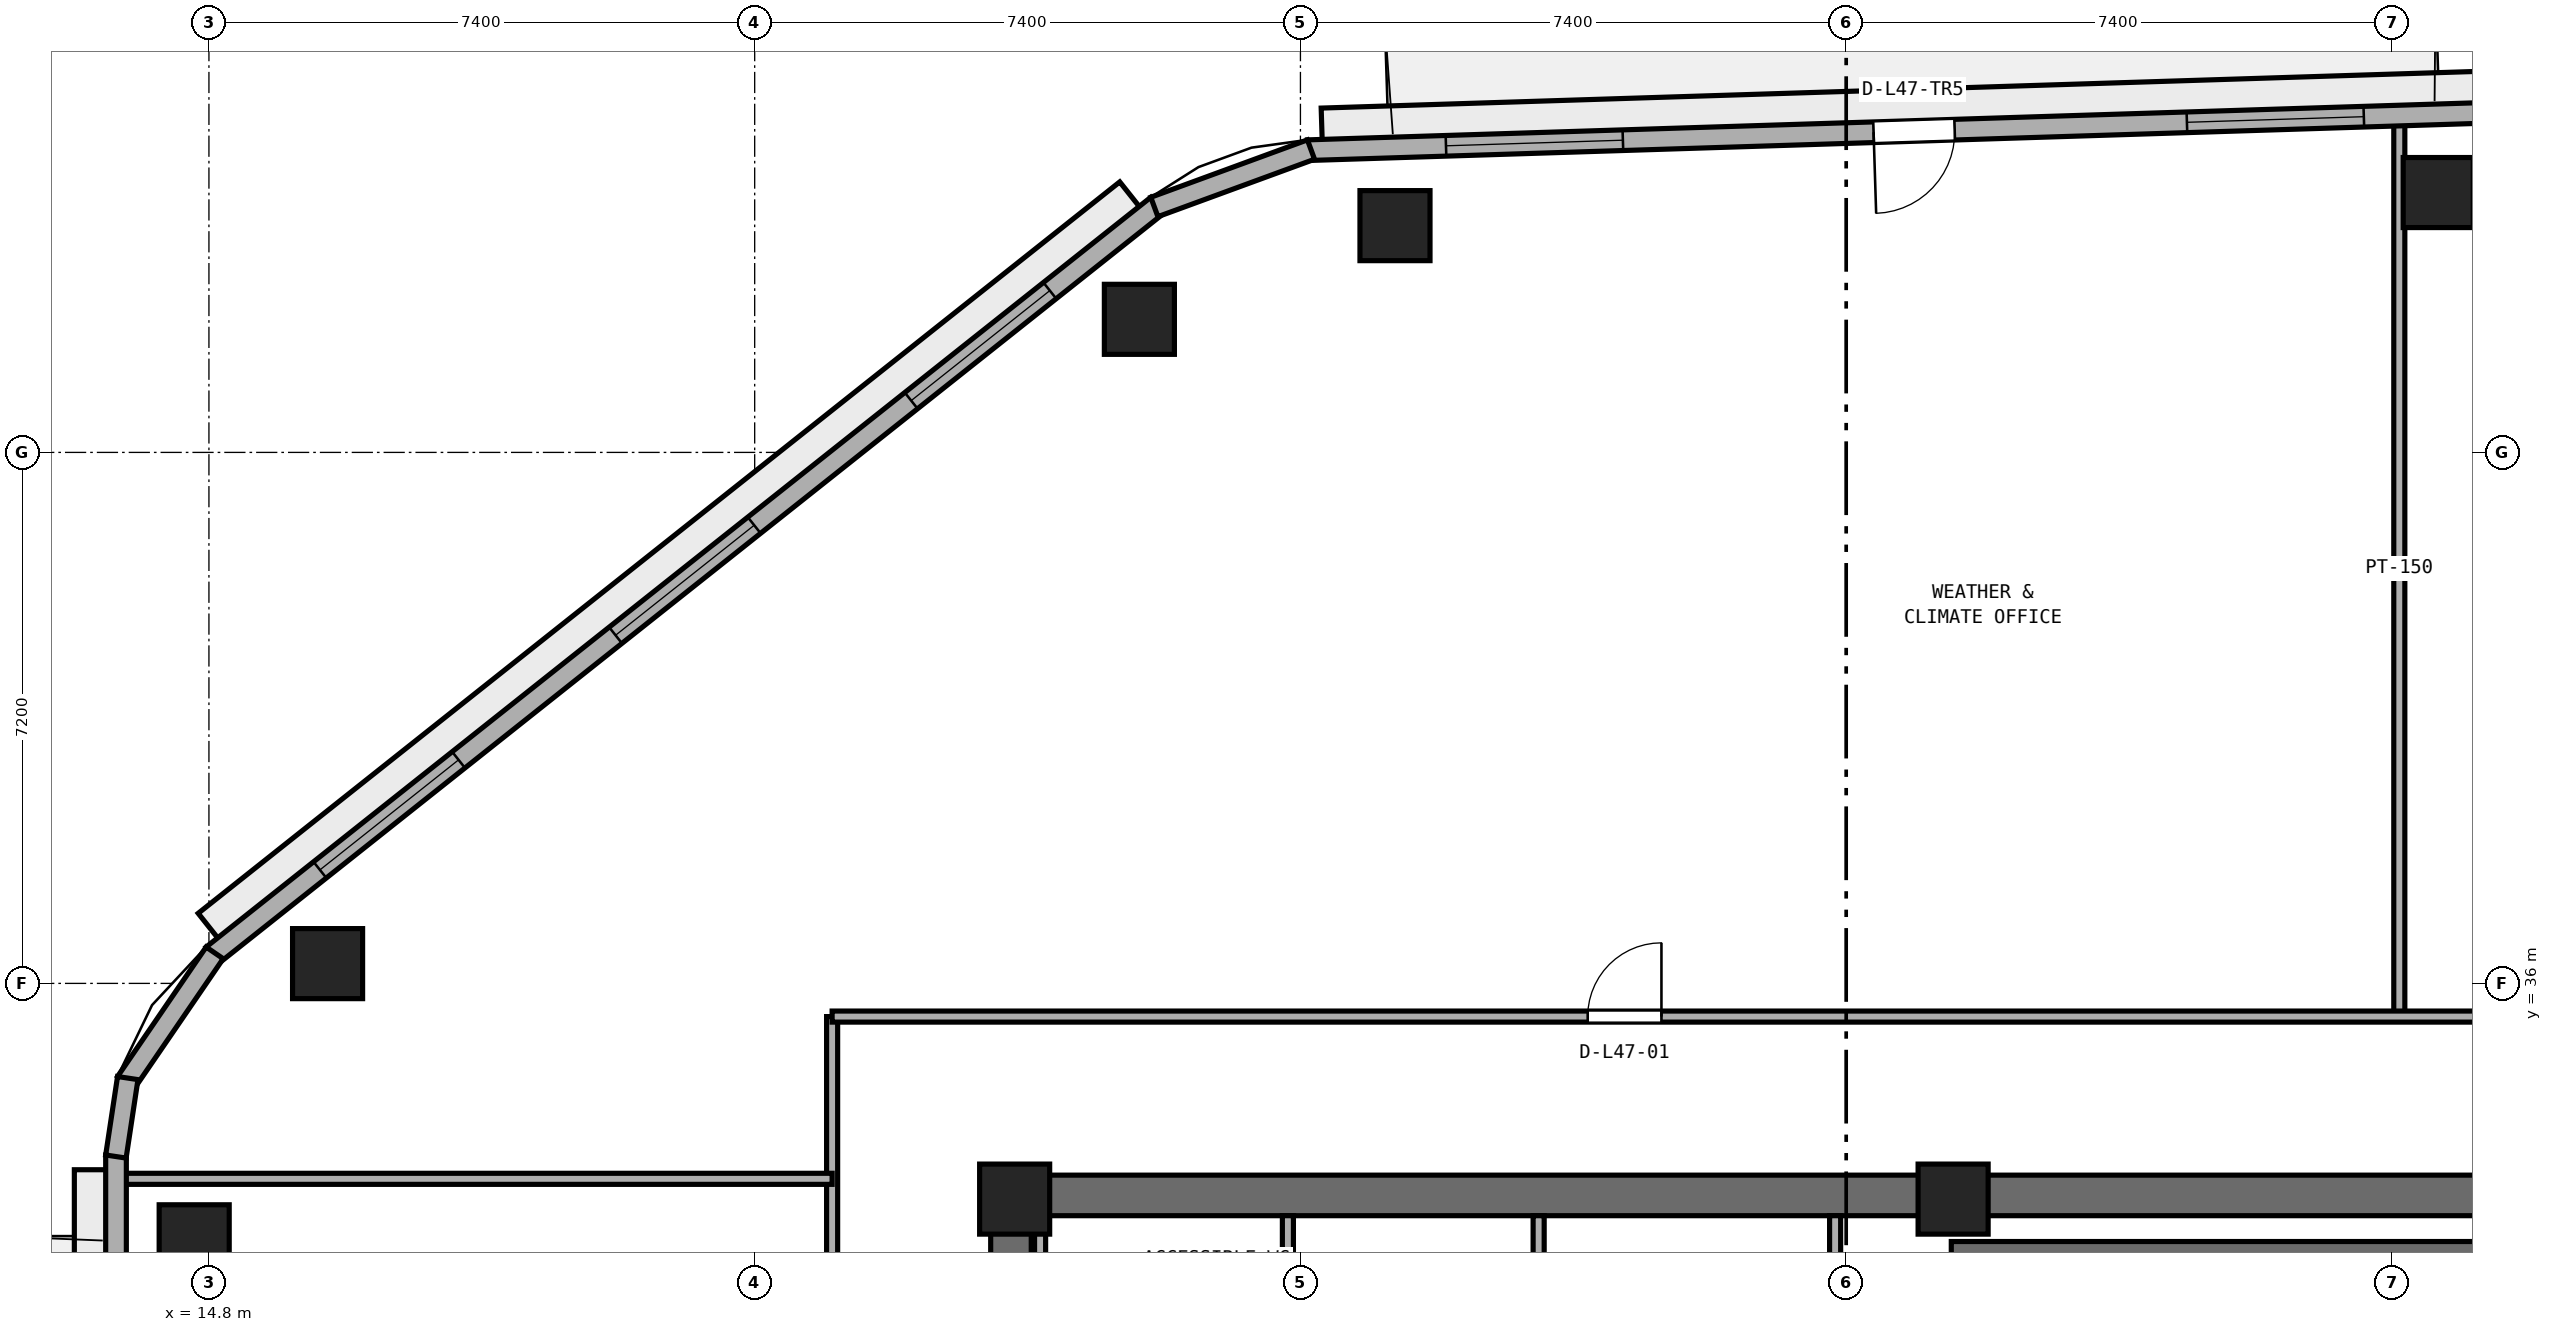
"""IFC4 building model, lengths in metres.
Left out: names, types, materials, properties, quantities, classifications, styles, units other than length and angle.
Written with IfcOpenShell. Run it as: python <this file> out.ifc"""

import sys

from ifc_helpers import new_model, si_unit, direction, frame, frame_2d, origin, origin_2d, place, context, subcontext, project, spatial, rectangle, extrude, element, fill, save


model = new_model("IFC4")
c1 = context("Model", 3, precision=1e-05, world=origin(), true_north=direction((0.0, 1.0)))
c2 = subcontext(c1, "Body", "Model", "MODEL_VIEW")
j1 = project(units=[si_unit("LENGTHUNIT", "METRE"), si_unit("PLANEANGLEUNIT", "RADIAN")], contexts=[c1])
p1 = place(None, origin())
s1 = spatial("IfcSite", under=j1, at=p1, CompositionType="ELEMENT")
p2 = place(p1, origin())
s2 = spatial("IfcBuilding", under=s1, at=p2, CompositionType="ELEMENT")
p3 = place(p2, frame((0.0, 0.0, 185.8)))
s3 = spatial("IfcBuildingStorey", under=s2, at=p3, CompositionType="ELEMENT", Elevation=185.8)
p4 = place(p3, frame((25.4, 33.125, 0.0), z_axis=(0.0, 0.0, 1.0), x_axis=(1.0, 0.0, 0.0)))
e1 = element("IfcWall", 1, at=p4, inside=s3, PredefinedType="SHEAR", context=c2, shape_type="SweptSolid", body=[
    extrude(rectangle(XDim=23.2, YDim=0.55, at=frame_2d((11.6, 0.0))), origin(), (0.0, 0.0, 1.0), 3.54),
])
p5 = place(p3, frame((25.675, 17.55, 0.0), z_axis=(0.0, 0.0, 1.0), x_axis=(0.0, 1.0, 0.0)))
e2 = element("IfcWall", 2, at=p5, inside=s3, PredefinedType="SHEAR", context=c2, shape_type="SweptSolid", body=[
    extrude(rectangle(XDim=15.3, YDim=0.55, at=frame_2d((7.65, 0.0))), origin(), (0.0, 0.0, 1.0), 3.54),
])
p6 = place(p5, frame((6.9, 0.0, 0.0)))
e3 = element("IfcOpeningElement", 3, at=p6, cuts=e2, PredefinedType="OPENING", context=c2, shape_type="SweptSolid", body=[
    extrude(rectangle(XDim=1.5, YDim=2.15, at=frame_2d((0.75, 1.075))), frame((0.0, 0.285, 0.0), z_axis=(0.0, -1.0, 0.0), x_axis=(1.0, 0.0, 0.0)), (0.0, 0.0, 1.0), 0.57),
])
for number, where, z_axis, x_axis in (
    (4, (38.45, 33.075, 0.0), (0.0, 0.0, 1.0), (1.0, 0.0, 0.0)),
    (5, (25.725, 33.075, 0.0), (0.0, 0.0, 1.0), (1.0, 0.0, 0.0)),
):
    element("IfcColumn", number, at=place(p3, frame(where, z_axis=z_axis, x_axis=x_axis)), inside=s3, PredefinedType="PILASTER", context=c2, shape_type="SweptSolid", body=[
        extrude(rectangle(XDim=0.95, YDim=0.95, at=origin_2d()), origin(), (0.0, 0.0, 1.0), 3.8),
    ])
for number, where, z_axis, x_axis in (
    (6, (45.028, 46.724, 0.0), (0.0, 0.0, 1.0), (1.0, 0.0, 0.0)),
    (7, (30.882, 46.275, 0.0), (0.0, 0.0, 1.0), (1.0, 0.0, 0.0)),
    (8, (27.416, 45.004, 0.0), (0.0, 0.0, 1.0), (1.0, 0.0, 0.0)),
    (9, (16.409, 36.268, 0.0), (0.0, 0.0, 1.0), (1.0, 0.0, 0.0)),
    (10, (14.6, 32.523, 0.0), (0.0, 0.0, 1.0), (1.0, 0.0, 0.0)),
):
    element("IfcColumn", number, at=place(p3, frame(where, z_axis=z_axis, x_axis=x_axis)), inside=s3, PredefinedType="COLUMN", context=c2, shape_type="SweptSolid", body=[
        extrude(rectangle(XDim=0.95, YDim=0.95, at=origin_2d()), origin(), (0.0, 0.0, 1.0), 3.8),
    ])
p7 = place(p3, frame((38.425, 32.375, 0.0), z_axis=(0.0, 0.0, 1.0), x_axis=(1.0, 0.0, 0.0)))
e11 = element("IfcWall", 11, at=p7, inside=s3, PredefinedType="SHEAR", context=c2, shape_type="SweptSolid", body=[
    extrude(rectangle(XDim=7.3, YDim=0.25, at=frame_2d((3.65, 0.0))), origin(), (0.0, 0.0, 1.0), 3.54),
])
p8 = place(p3, frame((26.07, 30.65, 0.0), z_axis=(0.0, 0.0, 1.0), x_axis=(0.0, 1.0, 0.0)))
e12 = element("IfcWall", 12, at=p8, inside=s3, PredefinedType="PARTITIONING", context=c2, shape_type="SweptSolid", body=[
    extrude(rectangle(XDim=2.2, YDim=0.15, at=frame_2d((1.1, 0.0))), origin(), (0.0, 0.0, 1.0), 2.64),
])
for number, where, z_axis, x_axis in (
    (13, (29.43, 30.65, 0.0), (0.0, 0.0, 1.0), (0.0, 1.0, 0.0)),
    (14, (32.83, 30.65, 0.0), (0.0, 0.0, 1.0), (0.0, 1.0, 0.0)),
    (15, (36.85, 30.65, 0.0), (0.0, 0.0, 1.0), (0.0, 1.0, 0.0)),
):
    element("IfcWall", number, at=place(p3, frame(where, z_axis=z_axis, x_axis=x_axis)), inside=s3, PredefinedType="PARTITIONING", context=c2, shape_type="SweptSolid", body=[
        extrude(rectangle(XDim=2.2, YDim=0.15, at=frame_2d((1.1, 0.0))), origin(), (0.0, 0.0, 1.0), 3.54),
    ])
p9 = place(p3, frame((44.5, 35.55, 0.0), z_axis=(0.0, 0.0, 1.0), x_axis=(0.0, 1.0, 0.0)))
e16 = element("IfcWall", 16, at=p9, inside=s3, PredefinedType="PARTITIONING", context=c2, shape_type="SweptSolid", body=[
    extrude(rectangle(XDim=12.152, YDim=0.15, at=frame_2d((6.076, 0.0))), origin(), (0.0, 0.0, 1.0), 3.54),
])
p10 = place(p3, frame((23.25, 26.55, 0.0), z_axis=(0.0, 0.0, 1.0), x_axis=(0.0, 1.0, 0.0)))
e17 = element("IfcWall", 17, at=p10, inside=s3, PredefinedType="PARTITIONING", context=c2, shape_type="SweptSolid", body=[
    extrude(rectangle(XDim=9.0, YDim=0.15, at=frame_2d((4.5, 0.0))), origin(), (0.0, 0.0, 1.0), 3.54),
])
p11 = place(p3, frame((13.605, 33.35, 0.0), z_axis=(0.0, 0.0, 1.0), x_axis=(1.0, 0.0, 0.0)))
e18 = element("IfcWall", 18, at=p11, inside=s3, PredefinedType="PARTITIONING", context=c2, shape_type="SweptSolid", body=[
    extrude(rectangle(XDim=9.645, YDim=0.15, at=frame_2d((4.823, 0.0))), origin(), (0.0, 0.0, 1.0), 3.54),
])
p12 = place(p3, frame((23.25, 35.55, 0.0), z_axis=(0.0, 0.0, 1.0), x_axis=(1.0, 0.0, 0.0)))
e19 = element("IfcWall", 19, at=p12, inside=s3, PredefinedType="PARTITIONING", context=c2, shape_type="SweptSolid", body=[
    extrude(rectangle(XDim=27.5, YDim=0.15, at=frame_2d((13.75, 0.0))), origin(), (0.0, 0.0, 1.0), 3.54),
])
p13 = place(p12, frame((10.245, 0.0, 0.0)))
e20 = element("IfcOpeningElement", 20, at=p13, cuts=e19, PredefinedType="OPENING", context=c2, shape_type="SweptSolid", body=[
    extrude(rectangle(XDim=1.0, YDim=2.12, at=frame_2d((0.5, 1.06))), frame((0.0, 0.085, 0.0), z_axis=(0.0, -1.0, 0.0), x_axis=(1.0, 0.0, 0.0)), (0.0, 0.0, 1.0), 0.17),
])
p14 = place(p12, frame((23.755, 0.0, 0.0)))
e21 = element("IfcOpeningElement", 21, at=p14, cuts=e19, PredefinedType="OPENING", context=c2, shape_type="SweptSolid", body=[
    extrude(rectangle(XDim=1.0, YDim=2.12, at=frame_2d((0.5, 1.06))), frame((0.0, 0.085, 0.0), z_axis=(0.0, -1.0, 0.0), x_axis=(1.0, 0.0, 0.0)), (0.0, 0.0, 1.0), 0.17),
])
p15 = place(p3, frame((46.143, 47.82, 0.0), z_axis=(0.0, 0.0, 1.0), x_axis=(-0.999497065256, -0.031711457627, 0.0)))
e22 = element("IfcWall", 22, at=p15, inside=s3, PredefinedType="STANDARD", context=c2, shape_type="SweptSolid", body=[
    extrude(rectangle(XDim=16.452, YDim=0.28, at=frame_2d((8.226, 0.0))), origin(), (0.0, 0.0, 1.0), 3.54),
])
p16 = place(p15, frame((7.676, 0.0, 0.0)))
e23 = element("IfcOpeningElement", 23, at=p16, cuts=e22, PredefinedType="OPENING", context=c2, shape_type="SweptSolid", body=[
    extrude(rectangle(XDim=1.1, YDim=2.2, at=frame_2d((0.55, 1.1))), frame((0.0, 0.15, 0.0), z_axis=(0.0, -1.0, 0.0), x_axis=(1.0, 0.0, 0.0)), (0.0, 0.0, 1.0), 0.3),
])
p17 = place(p15, frame((2.125, 0.0, 0.9)))
e24 = element("IfcOpeningElement", 24, at=p17, cuts=e22, PredefinedType="OPENING", context=c2, shape_type="SweptSolid", body=[
    extrude(rectangle(XDim=2.4, YDim=1.75, at=frame_2d((1.2, 0.875))), frame((0.0, 0.15, 0.0), z_axis=(0.0, -1.0, 0.0), x_axis=(1.0, 0.0, 0.0)), (0.0, 0.0, 1.0), 0.3),
])
p18 = place(p15, frame((12.177, 0.0, 0.9)))
e25 = element("IfcOpeningElement", 25, at=p18, cuts=e22, PredefinedType="OPENING", context=c2, shape_type="SweptSolid", body=[
    extrude(rectangle(XDim=2.4, YDim=1.75, at=frame_2d((1.2, 0.875))), frame((0.0, 0.15, 0.0), z_axis=(0.0, -1.0, 0.0), x_axis=(1.0, 0.0, 0.0)), (0.0, 0.0, 1.0), 0.3),
])
p19 = place(p3, frame((27.658, 46.55, 0.0), z_axis=(0.0, 0.0, 1.0), x_axis=(-0.783266285861, -0.621686356158, 0.0)))
e26 = element("IfcWall", 26, at=p19, inside=s3, PredefinedType="STANDARD", context=c2, shape_type="SweptSolid", body=[
    extrude(rectangle(XDim=16.353, YDim=0.28, at=frame_2d((8.177, 0.0))), origin(), (0.0, 0.0, 1.0), 3.54),
])
p20 = place(p19, frame((1.859, 0.0, 0.9)))
e27 = element("IfcOpeningElement", 27, at=p20, cuts=e26, PredefinedType="OPENING", context=c2, shape_type="SweptSolid", body=[
    extrude(rectangle(XDim=2.4, YDim=1.75, at=frame_2d((1.2, 0.875))), frame((0.0, 0.15, 0.0), z_axis=(0.0, -1.0, 0.0), x_axis=(1.0, 0.0, 0.0)), (0.0, 0.0, 1.0), 0.3),
])
p21 = place(p19, frame((6.977, 0.0, 0.9)))
e28 = element("IfcOpeningElement", 28, at=p21, cuts=e26, PredefinedType="OPENING", context=c2, shape_type="SweptSolid", body=[
    extrude(rectangle(XDim=2.4, YDim=1.75, at=frame_2d((1.2, 0.875))), frame((0.0, 0.15, 0.0), z_axis=(0.0, -1.0, 0.0), x_axis=(1.0, 0.0, 0.0)), (0.0, 0.0, 1.0), 0.3),
])
p22 = place(p19, frame((12.094, 0.0, 0.9)))
e29 = element("IfcOpeningElement", 29, at=p22, cuts=e26, PredefinedType="OPENING", context=c2, shape_type="SweptSolid", body=[
    extrude(rectangle(XDim=2.4, YDim=1.75, at=frame_2d((1.2, 0.875))), frame((0.0, 0.15, 0.0), z_axis=(0.0, -1.0, 0.0), x_axis=(1.0, 0.0, 0.0)), (0.0, 0.0, 1.0), 0.3),
])
p23 = place(p3, frame((13.54, 33.673, 0.0), z_axis=(0.0, 0.0, 1.0), x_axis=(0.0, -1.0, 0.0)))
e30 = element("IfcWall", 30, at=p23, inside=s3, PredefinedType="STANDARD", context=c2, shape_type="SweptSolid", body=[
    extrude(rectangle(XDim=17.751, YDim=0.28, at=frame_2d((8.875, 0.0))), origin(), (0.0, 0.0, 1.0), 3.54),
])
p24 = place(p23, frame((8.326, 0.0, 0.0)))
e31 = element("IfcOpeningElement", 31, at=p24, cuts=e30, PredefinedType="OPENING", context=c2, shape_type="SweptSolid", body=[
    extrude(rectangle(XDim=1.1, YDim=2.2, at=frame_2d((0.55, 1.1))), frame((0.0, 0.15, 0.0), z_axis=(0.0, -1.0, 0.0), x_axis=(1.0, 0.0, 0.0)), (0.0, 0.0, 1.0), 0.3),
])
p25 = place(p23, frame((2.092, 0.0, 0.9)))
e32 = element("IfcOpeningElement", 32, at=p25, cuts=e30, PredefinedType="OPENING", context=c2, shape_type="SweptSolid", body=[
    extrude(rectangle(XDim=2.4, YDim=1.75, at=frame_2d((1.2, 0.875))), frame((0.0, 0.15, 0.0), z_axis=(0.0, -1.0, 0.0), x_axis=(1.0, 0.0, 0.0)), (0.0, 0.0, 1.0), 0.3),
])
p26 = place(p23, frame((13.26, 0.0, 0.9)))
e33 = element("IfcOpeningElement", 33, at=p26, cuts=e30, PredefinedType="OPENING", context=c2, shape_type="SweptSolid", body=[
    extrude(rectangle(XDim=2.4, YDim=1.75, at=frame_2d((1.2, 0.875))), frame((0.0, 0.15, 0.0), z_axis=(0.0, -1.0, 0.0), x_axis=(1.0, 0.0, 0.0)), (0.0, 0.0, 1.0), 0.3),
])
p27 = place(p3, frame((29.743, 47.306, 0.0), z_axis=(0.0, 0.0, 1.0), x_axis=(-0.93893328381, -0.344099242302, 0.0)))
e34 = element("IfcWall", 34, at=p27, inside=s3, PredefinedType="STANDARD", context=c2, shape_type="SweptSolid", body=[
    extrude(rectangle(XDim=2.262, YDim=0.28, at=frame_2d((1.131, 0.0))), origin(), (0.0, 0.0, 1.0), 3.54),
])
p28 = place(p3, frame((14.878, 36.414, 0.0), z_axis=(0.0, 0.0, 1.0), x_axis=(-0.564564614133, -0.825388875906, 0.0)))
e35 = element("IfcWall", 35, at=p28, inside=s3, PredefinedType="STANDARD", context=c2, shape_type="SweptSolid", body=[
    extrude(rectangle(XDim=2.128, YDim=0.28, at=frame_2d((1.064, 0.0))), origin(), (0.0, 0.0, 1.0), 3.54),
])
p29 = place(p3, frame((13.699, 34.716, 0.0), z_axis=(0.0, 0.0, 1.0), x_axis=(-0.149549920187, -0.988754176412, 0.0)))
e36 = element("IfcWall", 36, at=p29, inside=s3, PredefinedType="STANDARD", context=c2, shape_type="SweptSolid", body=[
    extrude(rectangle(XDim=1.076, YDim=0.28, at=frame_2d((0.538, 0.0))), origin(), (0.0, 0.0, 1.0), 3.54),
])
p30 = place(p13, origin())
e37 = element("IfcDoor", 37, at=p30, inside=s3, OperationType="SINGLE_SWING_RIGHT", PredefinedType="DOOR", context=c2, shape_type="SweptSolid", body=[
    extrude(rectangle(XDim=1.0, YDim=2.12, at=frame_2d((0.5, 1.06))), frame((0.0, 0.025, 0.0), z_axis=(0.0, -1.0, 0.0), x_axis=(1.0, 0.0, 0.0)), (0.0, 0.0, 1.0), 0.05),
])
fill(e20, e37)
p31 = place(p16, origin())
e38 = element("IfcDoor", 38, at=p31, inside=s3, OperationType="SINGLE_SWING_RIGHT", PredefinedType="DOOR", context=c2, shape_type="SweptSolid", body=[
    extrude(rectangle(XDim=1.1, YDim=2.2, at=frame_2d((0.55, 1.1))), frame((0.0, 0.025, 0.0), z_axis=(0.0, -1.0, 0.0), x_axis=(1.0, 0.0, 0.0)), (0.0, 0.0, 1.0), 0.05),
])
fill(e23, e38)
p32 = place(p17, origin())
e39 = element("IfcWindow", 39, at=p32, inside=s3, PartitioningType="SINGLE_PANEL", PredefinedType="WINDOW", context=c2, shape_type="SweptSolid", body=[
    extrude(rectangle(XDim=2.4, YDim=1.75, at=frame_2d((1.2, 0.875))), frame((0.0, 0.03, 0.0), z_axis=(0.0, -1.0, 0.0), x_axis=(1.0, 0.0, 0.0)), (0.0, 0.0, 1.0), 0.06),
])
fill(e24, e39)
p33 = place(p18, origin())
e40 = element("IfcWindow", 40, at=p33, inside=s3, PartitioningType="SINGLE_PANEL", PredefinedType="WINDOW", context=c2, shape_type="SweptSolid", body=[
    extrude(rectangle(XDim=2.4, YDim=1.75, at=frame_2d((1.2, 0.875))), frame((0.0, 0.03, 0.0), z_axis=(0.0, -1.0, 0.0), x_axis=(1.0, 0.0, 0.0)), (0.0, 0.0, 1.0), 0.06),
])
fill(e25, e40)
p34 = place(p20, origin())
e41 = element("IfcWindow", 41, at=p34, inside=s3, PartitioningType="SINGLE_PANEL", PredefinedType="WINDOW", context=c2, shape_type="SweptSolid", body=[
    extrude(rectangle(XDim=2.4, YDim=1.75, at=frame_2d((1.2, 0.875))), frame((0.0, 0.03, 0.0), z_axis=(0.0, -1.0, 0.0), x_axis=(1.0, 0.0, 0.0)), (0.0, 0.0, 1.0), 0.06),
])
fill(e27, e41)
p35 = place(p21, origin())
e42 = element("IfcWindow", 42, at=p35, inside=s3, PartitioningType="SINGLE_PANEL", PredefinedType="WINDOW", context=c2, shape_type="SweptSolid", body=[
    extrude(rectangle(XDim=2.4, YDim=1.75, at=frame_2d((1.2, 0.875))), frame((0.0, 0.03, 0.0), z_axis=(0.0, -1.0, 0.0), x_axis=(1.0, 0.0, 0.0)), (0.0, 0.0, 1.0), 0.06),
])
fill(e28, e42)
p36 = place(p22, origin())
e43 = element("IfcWindow", 43, at=p36, inside=s3, PartitioningType="SINGLE_PANEL", PredefinedType="WINDOW", context=c2, shape_type="SweptSolid", body=[
    extrude(rectangle(XDim=2.4, YDim=1.75, at=frame_2d((1.2, 0.875))), frame((0.0, 0.03, 0.0), z_axis=(0.0, -1.0, 0.0), x_axis=(1.0, 0.0, 0.0)), (0.0, 0.0, 1.0), 0.06),
])
fill(e29, e43)
save(model, sys.argv[1])
